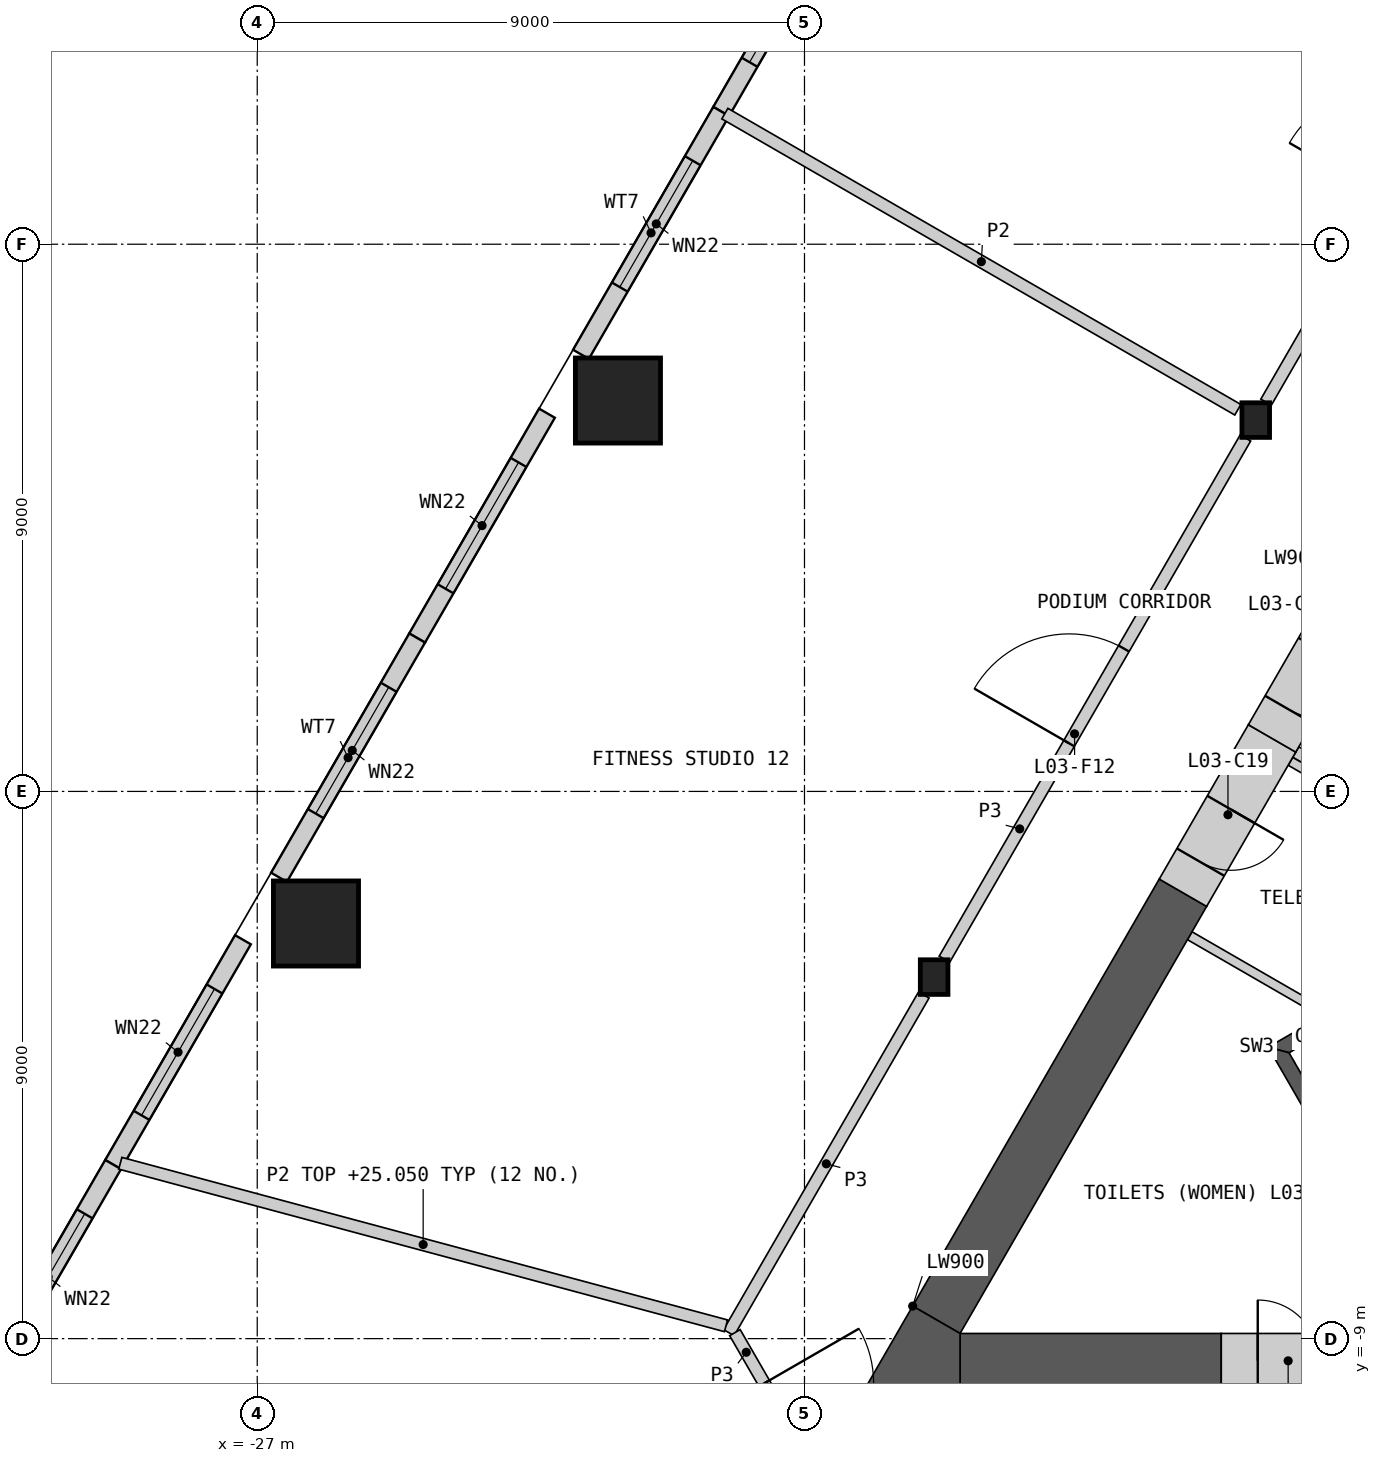
"""IFC4 building model, lengths in metres.
Left out: names, types, materials, properties, quantities, classifications, styles, units other than length and angle.
Written with IfcOpenShell. Run it as: python <this file> out.ifc"""

import sys

from ifc_helpers import new_model, si_unit, direction, frame, frame_2d, origin, origin_2d, place, context, subcontext, project, spatial, polyline, rectangle, hollow_rectangle, i_section, outline, extrude, element, fill, save


model = new_model("IFC4")
c1 = context("Model", 3, precision=1e-05, world=origin(), true_north=direction((0.0, 1.0)))
c2 = subcontext(c1, "Body", "Model", "MODEL_VIEW")
j1 = project(units=[si_unit("LENGTHUNIT", "METRE"), si_unit("PLANEANGLEUNIT", "RADIAN")], contexts=[c1])
p1 = place(None, origin())
s1 = spatial("IfcSite", under=j1, at=p1, CompositionType="ELEMENT")
p2 = place(p1, origin())
s2 = spatial("IfcBuilding", under=s1, at=p2, CompositionType="ELEMENT")
p3 = place(p2, frame((0.0, 0.0, 21.0)))
s3 = spatial("IfcBuildingStorey", under=s2, at=p3, CompositionType="ELEMENT", Elevation=21.0)
for number, where, z_axis, x_axis in (
    (1, (-21.068, 6.429, 0.0), (0.0, 0.0, 1.0), (1.0, 0.0, 0.0)),
    (2, (-26.034, -2.172, 0.0), (0.0, 0.0, 1.0), (1.0, 0.0, 0.0)),
):
    element("IfcColumn", number, at=place(p3, frame(where, z_axis=z_axis, x_axis=x_axis)), inside=s3, PredefinedType="COLUMN", context=c2, shape_type="SweptSolid", body=[
        extrude(hollow_rectangle(XDim=1.4, YDim=1.4, WallThickness=0.1, at=origin_2d()), origin(), (0.0, 0.0, 1.0), 4.5),
    ])
for number, where, z_axis, x_axis in (
    (3, (-10.578, 6.107, 0.0), (0.0, 0.0, 1.0), (1.0, 0.0, 0.0)),
    (4, (-15.868, -3.054, 0.0), (0.0, 0.0, 1.0), (1.0, 0.0, 0.0)),
):
    element("IfcColumn", number, at=place(p3, frame(where, z_axis=z_axis, x_axis=x_axis)), inside=s3, PredefinedType="COLUMN", context=c2, shape_type="SweptSolid", body=[
        extrude(i_section(OverallWidth=0.454, OverallDepth=0.57, WebThickness=0.078, FlangeThickness=0.125, at=origin_2d()), origin(), (0.0, 0.0, 1.0), 4.5),
    ])
p4 = place(p3, frame((-17.235, 14.881, 0.0), z_axis=(0.0, 0.0, 1.0), x_axis=(-0.499994660107, -0.866028486751, 0.0)))
e5 = element("IfcWall", 5, at=p4, inside=s3, PredefinedType="SOLIDWALL", context=c2, shape_type="SweptSolid", body=[
    extrude(rectangle(XDim=4.27, YDim=0.3, at=frame_2d((2.135, 0.0))), origin(), (0.0, 0.0, 1.0), 4.05),
])
p5 = place(p4, frame((0.935, 0.0, 0.9)))
e6 = element("IfcOpeningElement", 6, at=p5, cuts=e5, PredefinedType="OPENING", context=c2, shape_type="SweptSolid", body=[
    extrude(rectangle(XDim=2.4, YDim=2.55, at=frame_2d((1.2, 1.275))), frame((0.0, 0.16, 0.0), z_axis=(0.0, -1.0, 0.0), x_axis=(1.0, 0.0, 0.0)), (0.0, 0.0, 1.0), 0.32),
])
p6 = place(p3, frame((-19.37, 11.183, 0.0), z_axis=(0.0, 0.0, 1.0), x_axis=(-0.499982117899, -0.866035727774, 0.0)))
e7 = element("IfcWall", 7, at=p6, inside=s3, PredefinedType="SOLIDWALL", context=c2, shape_type="SweptSolid", body=[
    extrude(rectangle(XDim=4.612, YDim=0.3, at=frame_2d((2.306, 0.0))), origin(), (0.0, 0.0, 1.0), 4.05),
])
p7 = place(p6, frame((0.935, 0.0, 0.9)))
e8 = element("IfcOpeningElement", 8, at=p7, cuts=e7, PredefinedType="OPENING", context=c2, shape_type="SweptSolid", body=[
    extrude(rectangle(XDim=2.4, YDim=2.55, at=frame_2d((1.2, 1.275))), frame((0.0, 0.16, 0.0), z_axis=(0.0, -1.0, 0.0), x_axis=(1.0, 0.0, 0.0)), (0.0, 0.0, 1.0), 0.32),
])
p8 = place(p3, frame((-22.235, 6.221, 0.0), z_axis=(0.0, 0.0, 1.0), x_axis=(-0.500019418418, -0.866014192265, 0.0)))
e9 = element("IfcWall", 9, at=p8, inside=s3, PredefinedType="SOLIDWALL", context=c2, shape_type="SweptSolid", body=[
    extrude(rectangle(XDim=4.27, YDim=0.3, at=frame_2d((2.135, 0.0))), origin(), (0.0, 0.0, 1.0), 4.05),
])
p9 = place(p8, frame((0.935, 0.0, 0.9)))
e10 = element("IfcOpeningElement", 10, at=p9, cuts=e9, PredefinedType="OPENING", context=c2, shape_type="SweptSolid", body=[
    extrude(rectangle(XDim=2.4, YDim=2.55, at=frame_2d((1.2, 1.275))), frame((0.0, 0.16, 0.0), z_axis=(0.0, -1.0, 0.0), x_axis=(1.0, 0.0, 0.0)), (0.0, 0.0, 1.0), 0.32),
])
p10 = place(p3, frame((-24.37, 2.523, 0.0), z_axis=(0.0, 0.0, 1.0), x_axis=(-0.499964285679, -0.866046022475, 0.0)))
e11 = element("IfcWall", 11, at=p10, inside=s3, PredefinedType="SOLIDWALL", context=c2, shape_type="SweptSolid", body=[
    extrude(rectangle(XDim=4.544, YDim=0.3, at=frame_2d((2.272, 0.0))), origin(), (0.0, 0.0, 1.0), 4.05),
])
p11 = place(p10, frame((0.935, 0.0, 0.9)))
e12 = element("IfcOpeningElement", 12, at=p11, cuts=e11, PredefinedType="OPENING", context=c2, shape_type="SweptSolid", body=[
    extrude(rectangle(XDim=2.4, YDim=2.55, at=frame_2d((1.2, 1.275))), frame((0.0, 0.16, 0.0), z_axis=(0.0, -1.0, 0.0), x_axis=(1.0, 0.0, 0.0)), (0.0, 0.0, 1.0), 0.32),
])
p12 = place(p3, frame((-27.235, -2.439, 0.0), z_axis=(0.0, 0.0, 1.0), x_axis=(-0.499994660107, -0.866028486751, 0.0)))
e13 = element("IfcWall", 13, at=p12, inside=s3, PredefinedType="SOLIDWALL", context=c2, shape_type="SweptSolid", body=[
    extrude(rectangle(XDim=4.27, YDim=0.3, at=frame_2d((2.135, 0.0))), origin(), (0.0, 0.0, 1.0), 4.05),
])
p13 = place(p12, frame((0.935, 0.0, 0.9)))
e14 = element("IfcOpeningElement", 14, at=p13, cuts=e13, PredefinedType="OPENING", context=c2, shape_type="SweptSolid", body=[
    extrude(rectangle(XDim=2.4, YDim=2.55, at=frame_2d((1.2, 1.275))), frame((0.0, 0.16, 0.0), z_axis=(0.0, -1.0, 0.0), x_axis=(1.0, 0.0, 0.0)), (0.0, 0.0, 1.0), 0.32),
])
p14 = place(p3, frame((-29.37, -6.137, 0.0), z_axis=(0.0, 0.0, 1.0), x_axis=(-0.49999314502, -0.866029361473, 0.0)))
e15 = element("IfcWall", 15, at=p14, inside=s3, PredefinedType="SOLIDWALL", context=c2, shape_type="SweptSolid", body=[
    extrude(rectangle(XDim=4.476, YDim=0.3, at=frame_2d((2.238, 0.0))), origin(), (0.0, 0.0, 1.0), 4.05),
])
p15 = place(p14, frame((0.935, 0.0, 0.9)))
e16 = element("IfcOpeningElement", 16, at=p15, cuts=e15, PredefinedType="OPENING", context=c2, shape_type="SweptSolid", body=[
    extrude(rectangle(XDim=2.4, YDim=2.55, at=frame_2d((1.2, 1.275))), frame((0.0, 0.16, 0.0), z_axis=(0.0, -1.0, 0.0), x_axis=(1.0, 0.0, 0.0)), (0.0, 0.0, 1.0), 0.32),
])
p16 = place(p3, frame((-8.181, -0.357, 0.0), z_axis=(0.0, 0.0, 1.0), x_axis=(-0.866035824272, 0.499981950752, 0.0)))
e17 = element("IfcWall", 17, at=p16, inside=s3, PredefinedType="SHEAR", context=c2, shape_type="SweptSolid", body=[
    extrude(rectangle(XDim=2.009, YDim=0.2, at=frame_2d((1.004, 0.0))), origin(), (0.0, 0.0, 1.0), 4.05),
])
p17 = place(p3, origin())
e18 = element("IfcWall", 18, at=p17, inside=s3, PredefinedType="SHEAR", context=c2, shape_type="SweptSolid", body=[
    extrude(outline(polyline([(-5.307, -1.281), (-10.374, -4.206), (-10.032, -4.298), (-5.182, -1.498), (-5.307, -1.281)])), origin(), (0.0, 0.0, 1.0), 4.05),
])
p18 = place(p3, origin())
e19 = element("IfcWall", 19, at=p18, inside=s3, PredefinedType="SHEAR", context=c2, shape_type="SweptSolid", body=[
    extrude(outline(polyline([(-10.374, -4.206), (-8.83, -6.881), (-8.738, -6.539), (-10.032, -4.298), (-10.374, -4.206)])), origin(), (0.0, 0.0, 1.0), 4.05),
])
p19 = place(p3, frame((-8.268, -0.509, 0.0), z_axis=(0.0, 0.0, 1.0), x_axis=(-0.866035824272, 0.499981950752, 0.0)))
e20 = element("IfcWall", 20, at=p19, inside=s3, PredefinedType="PARTITIONING", context=c2, shape_type="SweptSolid", body=[
    extrude(rectangle(XDim=2.009, YDim=0.15, at=frame_2d((1.004, 0.0))), origin(), (0.0, 0.0, 1.0), 4.05),
])
p20 = place(p3, frame((-11.664, -2.373, 0.0), z_axis=(0.0, 0.0, 1.0), x_axis=(0.866075643493, -0.499912972175, 0.0)))
e21 = element("IfcWall", 21, at=p20, inside=s3, PredefinedType="PARTITIONING", context=c2, shape_type="SweptSolid", body=[
    extrude(rectangle(XDim=2.588, YDim=0.15, at=frame_2d((1.294, 0.0))), origin(), (0.0, 0.0, 1.0), 4.05),
])
p21 = place(p3, frame((-15.441, -9.365, 0.0), z_axis=(0.0, 0.0, 1.0), x_axis=(1.0, 0.0, 0.0)))
e22 = element("IfcWall", 22, at=p21, inside=s3, PredefinedType="SHEAR", context=c2, shape_type="SweptSolid", body=[
    extrude(rectangle(XDim=4.296, YDim=0.9, at=frame_2d((2.148, 0.0))), origin(), (0.0, 0.0, 1.0), 4.05),
])
p22 = place(p3, frame((-11.776, -1.667, 0.0), z_axis=(0.0, 0.0, 1.0), x_axis=(-0.499995201193, -0.866028174359, 0.0)))
e23 = element("IfcWall", 23, at=p22, inside=s3, PredefinedType="SHEAR", context=c2, shape_type="SweptSolid", body=[
    extrude(rectangle(XDim=8.11, YDim=0.9, at=frame_2d((4.055, 0.0))), origin(), (0.0, 0.0, 1.0), 4.05),
])
p23 = place(p3, origin())
e24 = element("IfcWall", 24, at=p23, inside=s3, PredefinedType="SHEAR", context=c2, shape_type="SweptSolid", body=[
    extrude(outline(polyline([(-16.221, -8.465), (-15.441, -8.915), (-15.441, -9.815), (-17.0, -9.815), (-16.221, -8.465)])), origin(), (0.0, 0.0, 1.0), 4.05),
])
p24 = place(p3, frame((-11.146, -9.365, 0.0), z_axis=(0.0, 0.0, 1.0), x_axis=(1.0, 0.0, 0.0)))
e25 = element("IfcWall", 25, at=p24, inside=s3, PredefinedType="SHEAR", context=c2, shape_type="SweptSolid", body=[
    extrude(rectangle(XDim=2.2, YDim=0.9, at=frame_2d((1.1, 0.0))), origin(), (0.0, 0.0, 1.0), 4.05),
])
p25 = place(p24, frame((0.6, 0.0, 0.0)))
e26 = element("IfcOpeningElement", 26, at=p25, cuts=e25, PredefinedType="OPENING", context=c2, shape_type="SweptSolid", body=[
    extrude(rectangle(XDim=1.0, YDim=2.1, at=frame_2d((0.5, 1.05))), frame((0.0, 0.46, 0.0), z_axis=(0.0, -1.0, 0.0), x_axis=(1.0, 0.0, 0.0)), (0.0, 0.0, 1.0), 0.92),
])
p26 = place(p3, frame((-10.31, 0.872, 0.0), z_axis=(0.0, 0.0, 1.0), x_axis=(-0.499982003349, -0.866035793907, 0.0)))
e27 = element("IfcWall", 27, at=p26, inside=s3, PredefinedType="SHEAR", context=c2, shape_type="SweptSolid", body=[
    extrude(rectangle(XDim=2.931, YDim=0.9, at=frame_2d((1.466, 0.0))), origin(), (0.0, 0.0, 1.0), 4.05),
])
p27 = place(p26, frame((1.35, 0.0, 0.0)))
e28 = element("IfcOpeningElement", 28, at=p27, cuts=e27, PredefinedType="OPENING", context=c2, shape_type="SweptSolid", body=[
    extrude(rectangle(XDim=1.0, YDim=2.1, at=frame_2d((0.5, 1.05))), frame((0.0, 0.46, 0.0), z_axis=(0.0, -1.0, 0.0), x_axis=(1.0, 0.0, 0.0)), (0.0, 0.0, 1.0), 0.92),
])
p28 = place(p3, frame((-9.21, 2.777, 0.0), z_axis=(0.0, 0.0, 1.0), x_axis=(-0.500077893725, -0.86598042715, 0.0)))
e29 = element("IfcWall", 29, at=p28, inside=s3, PredefinedType="SHEAR", context=c2, shape_type="SweptSolid", body=[
    extrude(rectangle(XDim=2.2, YDim=0.9, at=frame_2d((1.1, 0.0))), origin(), (0.0, 0.0, 1.0), 4.05),
])
p29 = place(p28, frame((0.55, 0.0, 0.0)))
e30 = element("IfcOpeningElement", 30, at=p29, cuts=e29, PredefinedType="OPENING", context=c2, shape_type="SweptSolid", body=[
    extrude(rectangle(XDim=1.1, YDim=2.1, at=frame_2d((0.55, 1.05))), frame((0.0, 0.46, 0.0), z_axis=(0.0, -1.0, 0.0), x_axis=(1.0, 0.0, 0.0)), (0.0, 0.0, 1.0), 0.92),
])
p30 = place(p3, frame((-15.698, -2.759, 0.0), z_axis=(0.0, 0.0, 1.0), x_axis=(0.500004292778, 0.866022925334, 0.0)))
e31 = element("IfcWall", 31, at=p30, inside=s3, PredefinedType="PARTITIONING", context=c2, shape_type="SweptSolid", body=[
    extrude(rectangle(XDim=9.898, YDim=0.2, at=frame_2d((4.949, 0.0))), origin(), (0.0, 0.0, 1.0), 4.05),
])
p31 = place(p30, frame((4.1, 0.0, 0.0)))
e32 = element("IfcOpeningElement", 32, at=p31, cuts=e31, PredefinedType="OPENING", context=c2, shape_type="SweptSolid", body=[
    extrude(rectangle(XDim=1.8, YDim=2.1, at=frame_2d((0.9, 1.05))), frame((0.0, 0.11, 0.0), z_axis=(0.0, -1.0, 0.0), x_axis=(1.0, 0.0, 0.0)), (0.0, 0.0, 1.0), 0.22),
])
p32 = place(p3, frame((-10.408, 6.402, 0.0), z_axis=(0.0, 0.0, 1.0), x_axis=(0.499986904098, 0.866032964575, 0.0)))
e33 = element("IfcWall", 33, at=p32, inside=s3, PredefinedType="PARTITIONING", context=c2, shape_type="SweptSolid", body=[
    extrude(rectangle(XDim=9.67, YDim=0.2, at=frame_2d((4.835, 0.0))), origin(), (0.0, 0.0, 1.0), 4.05),
])
p33 = place(p32, frame((3.884, 0.0, 0.0)))
e34 = element("IfcOpeningElement", 34, at=p33, cuts=e33, PredefinedType="OPENING", context=c2, shape_type="SweptSolid", body=[
    extrude(rectangle(XDim=1.8, YDim=2.1, at=frame_2d((0.9, 1.05))), frame((0.0, 0.11, 0.0), z_axis=(0.0, -1.0, 0.0), x_axis=(1.0, 0.0, 0.0)), (0.0, 0.0, 1.0), 0.22),
])
p34 = place(p3, frame((-19.244, -8.902, 0.0), z_axis=(0.0, 0.0, 1.0), x_axis=(0.499988314375, 0.866032150378, 0.0)))
e35 = element("IfcWall", 35, at=p34, inside=s3, PredefinedType="PARTITIONING", context=c2, shape_type="SweptSolid", body=[
    extrude(rectangle(XDim=6.412, YDim=0.2, at=frame_2d((3.206, 0.0))), origin(), (0.0, 0.0, 1.0), 4.05),
])
p35 = place(p3, frame((-19.144, -8.902, 0.0), z_axis=(0.0, 0.0, 1.0), x_axis=(0.499958791762, -0.866049194065, 0.0)))
e36 = element("IfcWall", 36, at=p35, inside=s3, PredefinedType="PARTITIONING", context=c2, shape_type="SweptSolid", body=[
    extrude(rectangle(XDim=3.726, YDim=0.2, at=frame_2d((1.863, 0.0))), origin(), (0.0, 0.0, 1.0), 4.05),
])
p36 = place(p35, frame((0.963, 0.0, 0.0)))
e37 = element("IfcOpeningElement", 37, at=p36, cuts=e36, PredefinedType="OPENING", context=c2, shape_type="SweptSolid", body=[
    extrude(rectangle(XDim=1.8, YDim=2.1, at=frame_2d((0.9, 1.05))), frame((0.0, 0.11, 0.0), z_axis=(0.0, -1.0, 0.0), x_axis=(1.0, 0.0, 0.0)), (0.0, 0.0, 1.0), 0.22),
])
p37 = place(p3, frame((-29.252, -6.115, 0.0), z_axis=(0.0, 0.0, 1.0), x_axis=(0.965818413341, -0.259219583464, 0.0)))
e38 = element("IfcWall", 38, at=p37, inside=s3, PredefinedType="PARTITIONING", context=c2, shape_type="SweptSolid", body=[
    extrude(rectangle(XDim=10.314, YDim=0.2, at=frame_2d((5.157, 0.0))), origin(), (0.0, 0.0, 1.0), 4.05),
])
p38 = place(p3, frame((-19.31, 11.148, 0.0), z_axis=(0.0, 0.0, 1.0), x_axis=(0.866029077831, -0.499993636311, 0.0)))
e39 = element("IfcWall", 39, at=p38, inside=s3, PredefinedType="PARTITIONING", context=c2, shape_type="SweptSolid", body=[
    extrude(rectangle(XDim=9.741, YDim=0.2, at=frame_2d((4.871, 0.0))), origin(), (0.0, 0.0, 1.0), 4.05),
])
p39 = place(p5, origin())
e40 = element("IfcWindow", 40, at=p39, inside=s3, PartitioningType="SINGLE_PANEL", PredefinedType="WINDOW", context=c2, shape_type="SweptSolid", body=[
    extrude(rectangle(XDim=2.4, YDim=2.55, at=frame_2d((1.2, 1.275))), frame((0.0, 0.03, 0.0), z_axis=(0.0, -1.0, 0.0), x_axis=(1.0, 0.0, 0.0)), (0.0, 0.0, 1.0), 0.06),
])
fill(e6, e40)
p40 = place(p7, origin())
e41 = element("IfcWindow", 41, at=p40, inside=s3, PartitioningType="SINGLE_PANEL", PredefinedType="WINDOW", context=c2, shape_type="SweptSolid", body=[
    extrude(rectangle(XDim=2.4, YDim=2.55, at=frame_2d((1.2, 1.275))), frame((0.0, 0.03, 0.0), z_axis=(0.0, -1.0, 0.0), x_axis=(1.0, 0.0, 0.0)), (0.0, 0.0, 1.0), 0.06),
])
fill(e8, e41)
p41 = place(p9, origin())
e42 = element("IfcWindow", 42, at=p41, inside=s3, PartitioningType="SINGLE_PANEL", PredefinedType="WINDOW", context=c2, shape_type="SweptSolid", body=[
    extrude(rectangle(XDim=2.4, YDim=2.55, at=frame_2d((1.2, 1.275))), frame((0.0, 0.03, 0.0), z_axis=(0.0, -1.0, 0.0), x_axis=(1.0, 0.0, 0.0)), (0.0, 0.0, 1.0), 0.06),
])
fill(e10, e42)
p42 = place(p11, origin())
e43 = element("IfcWindow", 43, at=p42, inside=s3, PartitioningType="SINGLE_PANEL", PredefinedType="WINDOW", context=c2, shape_type="SweptSolid", body=[
    extrude(rectangle(XDim=2.4, YDim=2.55, at=frame_2d((1.2, 1.275))), frame((0.0, 0.03, 0.0), z_axis=(0.0, -1.0, 0.0), x_axis=(1.0, 0.0, 0.0)), (0.0, 0.0, 1.0), 0.06),
])
fill(e12, e43)
p43 = place(p13, origin())
e44 = element("IfcWindow", 44, at=p43, inside=s3, PartitioningType="SINGLE_PANEL", PredefinedType="WINDOW", context=c2, shape_type="SweptSolid", body=[
    extrude(rectangle(XDim=2.4, YDim=2.55, at=frame_2d((1.2, 1.275))), frame((0.0, 0.03, 0.0), z_axis=(0.0, -1.0, 0.0), x_axis=(1.0, 0.0, 0.0)), (0.0, 0.0, 1.0), 0.06),
])
fill(e14, e44)
p44 = place(p15, origin())
e45 = element("IfcWindow", 45, at=p44, inside=s3, PartitioningType="SINGLE_PANEL", PredefinedType="WINDOW", context=c2, shape_type="SweptSolid", body=[
    extrude(rectangle(XDim=2.4, YDim=2.55, at=frame_2d((1.2, 1.275))), frame((0.0, 0.03, 0.0), z_axis=(0.0, -1.0, 0.0), x_axis=(1.0, 0.0, 0.0)), (0.0, 0.0, 1.0), 0.06),
])
fill(e16, e45)
p45 = place(p25, origin())
e46 = element("IfcDoor", 46, at=p45, inside=s3, OperationType="SINGLE_SWING_LEFT", PredefinedType="DOOR", context=c2, shape_type="SweptSolid", body=[
    extrude(rectangle(XDim=1.0, YDim=2.1, at=frame_2d((0.5, 1.05))), frame((0.0, 0.205, 0.0), z_axis=(0.0, -1.0, 0.0), x_axis=(1.0, 0.0, 0.0)), (0.0, 0.0, 1.0), 0.05),
])
fill(e26, e46)
p46 = place(p27, origin())
e47 = element("IfcDoor", 47, at=p46, inside=s3, OperationType="SINGLE_SWING_LEFT", PredefinedType="DOOR", context=c2, shape_type="SweptSolid", body=[
    extrude(rectangle(XDim=1.0, YDim=2.1, at=frame_2d((0.5, 1.05))), frame((0.0, 0.205, 0.0), z_axis=(0.0, -1.0, 0.0), x_axis=(1.0, 0.0, 0.0)), (0.0, 0.0, 1.0), 0.05),
])
fill(e28, e47)
p47 = place(p29, origin())
e48 = element("IfcDoor", 48, at=p47, inside=s3, OperationType="SINGLE_SWING_LEFT", PredefinedType="DOOR", context=c2, shape_type="SweptSolid", body=[
    extrude(rectangle(XDim=1.1, YDim=2.1, at=frame_2d((0.55, 1.05))), frame((0.0, 0.205, 0.0), z_axis=(0.0, -1.0, 0.0), x_axis=(1.0, 0.0, 0.0)), (0.0, 0.0, 1.0), 0.05),
])
fill(e30, e48)
p48 = place(p36, origin())
e49 = element("IfcDoor", 49, at=p48, inside=s3, OperationType="DOUBLE_DOOR_SINGLE_SWING", PredefinedType="DOOR", context=c2, shape_type="SweptSolid", body=[
    extrude(rectangle(XDim=1.8, YDim=2.1, at=frame_2d((0.9, 1.05))), frame((0.0, 0.025, 0.0), z_axis=(0.0, -1.0, 0.0), x_axis=(1.0, 0.0, 0.0)), (0.0, 0.0, 1.0), 0.05),
])
fill(e37, e49)
p49 = place(p31, origin())
e50 = element("IfcDoor", 50, at=p49, inside=s3, OperationType="DOUBLE_DOOR_SINGLE_SWING", PredefinedType="DOOR", context=c2, shape_type="SweptSolid", body=[
    extrude(rectangle(XDim=1.8, YDim=2.1, at=frame_2d((0.9, 1.05))), frame((0.0, 0.025, 0.0), z_axis=(0.0, -1.0, 0.0), x_axis=(1.0, 0.0, 0.0)), (0.0, 0.0, 1.0), 0.05),
])
fill(e32, e50)
save(model, sys.argv[1])
